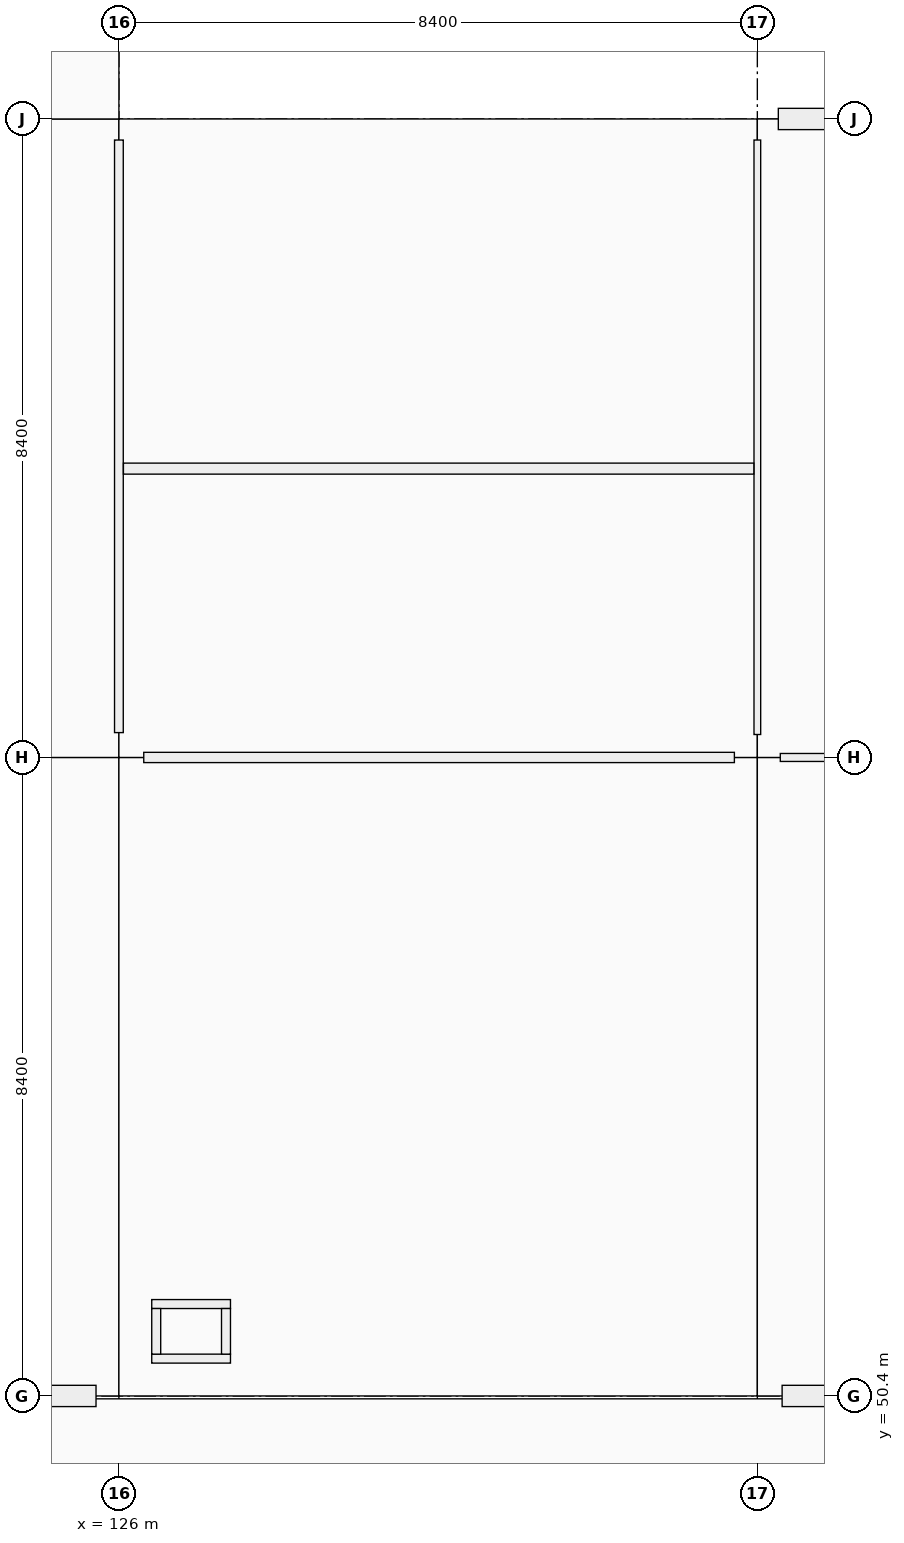
"""IFC4 building model, lengths in metres.
Left out: names, types, materials, properties, quantities, classifications, styles, units other than length and angle.
Written with IfcOpenShell. Run it as: python <this file> out.ifc"""

import sys

from ifc_helpers import new_model, si_unit, direction, frame, frame_2d, origin, origin_2d, place, context, subcontext, project, spatial, rectangle, extrude, element, fill, save


model = new_model("IFC4")
c1 = context("Model", 3, precision=1e-05, world=origin(), true_north=direction((0.0, 1.0)))
c2 = subcontext(c1, "Body", "Model", "MODEL_VIEW")
j1 = project(units=[si_unit("LENGTHUNIT", "METRE"), si_unit("PLANEANGLEUNIT", "RADIAN")], contexts=[c1])
p1 = place(None, origin())
s1 = spatial("IfcSite", under=j1, at=p1, CompositionType="ELEMENT")
p2 = place(p1, origin())
s2 = spatial("IfcBuilding", under=s1, at=p2, CompositionType="ELEMENT")
p3 = place(p2, frame((0.0, 0.0, 10.26)))
s3 = spatial("IfcBuildingStorey", under=s2, at=p3, CompositionType="ELEMENT", Elevation=10.26)
p4 = place(p3, frame((126.0, 50.4, 0.0), z_axis=(0.0, 0.0, 1.0), x_axis=(1.0, 0.0, 0.0)))
e1 = element("IfcColumn", 1, at=p4, inside=s3, PredefinedType="COLUMN", context=c2, shape_type="SweptSolid", body=[
    extrude(rectangle(XDim=0.6, YDim=0.6, at=origin_2d()), origin(), (0.0, 0.0, 1.0), 4.5),
])
p5 = place(p3, frame((126.0, 58.8, 0.0), z_axis=(0.0, 0.0, 1.0), x_axis=(1.0, 0.0, 0.0)))
e2 = element("IfcColumn", 2, at=p5, inside=s3, PredefinedType="COLUMN", context=c2, shape_type="SweptSolid", body=[
    extrude(rectangle(XDim=0.65, YDim=0.65, at=origin_2d()), origin(), (0.0, 0.0, 1.0), 4.5),
])
p6 = place(p3, frame((126.0, 67.2, 0.0), z_axis=(0.0, 0.0, 1.0), x_axis=(1.0, 0.0, 0.0)))
e3 = element("IfcColumn", 3, at=p6, inside=s3, PredefinedType="COLUMN", context=c2, shape_type="SweptSolid", body=[
    extrude(rectangle(XDim=0.55, YDim=0.55, at=origin_2d()), origin(), (0.0, 0.0, 1.0), 4.25),
])
p7 = place(p3, frame((134.4, 50.4, 0.0), z_axis=(0.0, 0.0, 1.0), x_axis=(1.0, 0.0, 0.0)))
e4 = element("IfcColumn", 4, at=p7, inside=s3, PredefinedType="COLUMN", context=c2, shape_type="SweptSolid", body=[
    extrude(rectangle(XDim=0.65, YDim=0.65, at=origin_2d()), origin(), (0.0, 0.0, 1.0), 4.5),
])
p8 = place(p3, frame((134.4, 58.8, 0.0), z_axis=(0.0, 0.0, 1.0), x_axis=(1.0, 0.0, 0.0)))
e5 = element("IfcColumn", 5, at=p8, inside=s3, PredefinedType="COLUMN", context=c2, shape_type="SweptSolid", body=[
    extrude(rectangle(XDim=0.6, YDim=0.6, at=origin_2d()), origin(), (0.0, 0.0, 1.0), 4.5),
])
p9 = place(p3, frame((134.4, 67.2, 0.0), z_axis=(0.0, 0.0, 1.0), x_axis=(1.0, 0.0, 0.0)))
e6 = element("IfcColumn", 6, at=p9, inside=s3, PredefinedType="COLUMN", context=c2, shape_type="SweptSolid", body=[
    extrude(rectangle(XDim=0.55, YDim=0.55, at=origin_2d()), origin(), (0.0, 0.0, 1.0), 4.25),
])
p10 = place(p3, frame((125.699, 50.4, 0.0), z_axis=(0.0, 0.0, 1.0), x_axis=(-1.0, 0.0, 0.0)))
e7 = element("IfcWall", 7, at=p10, inside=s3, PredefinedType="SOLIDWALL", context=c2, shape_type="SweptSolid", body=[
    extrude(rectangle(XDim=7.773, YDim=0.28, at=frame_2d((3.886, 0.0))), origin(), (0.0, 0.0, 1.0), 3.54),
])
p11 = place(p10, frame((2.611, 0.0, 0.9)))
e8 = element("IfcOpeningElement", 8, at=p11, cuts=e7, PredefinedType="OPENING", context=c2, shape_type="SweptSolid", body=[
    extrude(rectangle(XDim=2.55, YDim=1.95, at=frame_2d((1.275, 0.975))), frame((0.0, 0.14, 0.0), z_axis=(0.0, -1.0, 0.0), x_axis=(1.0, 0.0, 0.0)), (0.0, 0.0, 1.0), 0.28),
])
p12 = place(p3, frame((142.499, 50.4, 0.0), z_axis=(0.0, 0.0, 1.0), x_axis=(-1.0, 0.0, 0.0)))
e9 = element("IfcWall", 9, at=p12, inside=s3, PredefinedType="SOLIDWALL", context=c2, shape_type="SweptSolid", body=[
    extrude(rectangle(XDim=7.773, YDim=0.28, at=frame_2d((3.886, 0.0))), origin(), (0.0, 0.0, 1.0), 3.54),
])
p13 = place(p12, frame((2.911, 0.0, 0.9)))
e10 = element("IfcOpeningElement", 10, at=p13, cuts=e9, PredefinedType="OPENING", context=c2, shape_type="SweptSolid", body=[
    extrude(rectangle(XDim=1.95, YDim=1.6, at=frame_2d((0.975, 0.8))), frame((0.0, 0.14, 0.0), z_axis=(0.0, -1.0, 0.0), x_axis=(1.0, 0.0, 0.0)), (0.0, 0.0, 1.0), 0.28),
])
p14 = place(p3, frame((134.676, 67.2, 0.0), z_axis=(0.0, 0.0, 1.0), x_axis=(1.0, 0.0, 0.0)))
e11 = element("IfcWall", 11, at=p14, inside=s3, PredefinedType="SOLIDWALL", context=c2, shape_type="SweptSolid", body=[
    extrude(rectangle(XDim=7.823, YDim=0.28, at=frame_2d((3.912, 0.0))), origin(), (0.0, 0.0, 1.0), 3.54),
])
p15 = place(p14, frame((2.737, 0.0, 0.9)))
e12 = element("IfcOpeningElement", 12, at=p15, cuts=e11, PredefinedType="OPENING", context=c2, shape_type="SweptSolid", body=[
    extrude(rectangle(XDim=2.35, YDim=1.6, at=frame_2d((1.175, 0.8))), frame((0.0, 0.14, 0.0), z_axis=(0.0, -1.0, 0.0), x_axis=(1.0, 0.0, 0.0)), (0.0, 0.0, 1.0), 0.28),
])
for number, where, z_axis, x_axis in (
    (13, (126.432, 50.891, 0.0), (0.0, 0.0, 1.0), (1.0, 0.0, 0.0)),
    (14, (126.432, 51.609, 0.0), (0.0, 0.0, 1.0), (1.0, 0.0, 0.0)),
):
    element("IfcWall", number, at=place(p3, frame(where, z_axis=z_axis, x_axis=x_axis)), inside=s3, PredefinedType="PARTITIONING", context=c2, shape_type="SweptSolid", body=[
        extrude(rectangle(XDim=1.036, YDim=0.118, at=frame_2d((0.518, 0.0))), origin(), (0.0, 0.0, 1.0), 3.53),
    ])
for number, where, z_axis, x_axis in (
    (15, (126.491, 50.95, 0.0), (0.0, 0.0, 1.0), (0.0, 1.0, 0.0)),
    (16, (127.409, 50.95, 0.0), (0.0, 0.0, 1.0), (0.0, 1.0, 0.0)),
):
    element("IfcWall", number, at=place(p3, frame(where, z_axis=z_axis, x_axis=x_axis)), inside=s3, PredefinedType="PARTITIONING", context=c2, shape_type="SweptSolid", body=[
        extrude(rectangle(XDim=0.6, YDim=0.118, at=frame_2d((0.3, 0.0))), origin(), (0.0, 0.0, 1.0), 3.53),
    ])
p16 = place(p3, frame((126.327, 58.8, 0.0), z_axis=(0.0, 0.0, 1.0), x_axis=(1.0, 0.0, 0.0)))
e17 = element("IfcWall", 17, at=p16, inside=s3, PredefinedType="PARTITIONING", context=c2, shape_type="SweptSolid", body=[
    extrude(rectangle(XDim=7.771, YDim=0.135, at=frame_2d((3.885, 0.0))), origin(), (0.0, 0.0, 1.0), 3.37),
])
p17 = place(p3, frame((134.702, 58.8, 0.0), z_axis=(0.0, 0.0, 1.0), x_axis=(1.0, 0.0, 0.0)))
e18 = element("IfcWall", 18, at=p17, inside=s3, PredefinedType="PARTITIONING", context=c2, shape_type="SweptSolid", body=[
    extrude(rectangle(XDim=7.771, YDim=0.105, at=frame_2d((3.885, 0.0))), origin(), (0.0, 0.0, 1.0), 3.37),
])
p18 = place(p17, frame((3.415, 0.0, 0.0)))
e19 = element("IfcOpeningElement", 19, at=p18, cuts=e18, PredefinedType="OPENING", context=c2, shape_type="SweptSolid", body=[
    extrude(rectangle(XDim=0.94, YDim=2.15, at=frame_2d((0.47, 1.075))), frame((0.0, 0.052, 0.0), z_axis=(0.0, -1.0, 0.0), x_axis=(1.0, 0.0, 0.0)), (0.0, 0.0, 1.0), 0.105),
])
p19 = place(p3, frame((126.0, 59.127, 0.0), z_axis=(0.0, 0.0, 1.0), x_axis=(0.0, 1.0, 0.0)))
e20 = element("IfcWall", 20, at=p19, inside=s3, PredefinedType="PARTITIONING", context=c2, shape_type="SweptSolid", body=[
    extrude(rectangle(XDim=7.796, YDim=0.115, at=frame_2d((3.898, 0.0))), origin(), (0.0, 0.0, 1.0), 3.37),
])
p20 = place(p19, frame((1.253, 0.0, 0.0)))
e21 = element("IfcOpeningElement", 21, at=p20, cuts=e20, PredefinedType="OPENING", context=c2, shape_type="SweptSolid", body=[
    extrude(rectangle(XDim=0.92, YDim=2.15, at=frame_2d((0.46, 1.075))), frame((0.0, 0.058, 0.0), z_axis=(0.0, -1.0, 0.0), x_axis=(1.0, 0.0, 0.0)), (0.0, 0.0, 1.0), 0.115),
])
p21 = place(p19, frame((5.108, 0.0, 0.0)))
e22 = element("IfcOpeningElement", 22, at=p21, cuts=e20, PredefinedType="OPENING", context=c2, shape_type="SweptSolid", body=[
    extrude(rectangle(XDim=1.05, YDim=2.12, at=frame_2d((0.525, 1.06))), frame((0.0, 0.058, 0.0), z_axis=(0.0, -1.0, 0.0), x_axis=(1.0, 0.0, 0.0)), (0.0, 0.0, 1.0), 0.115),
])
p22 = place(p3, frame((134.4, 59.102, 0.0), z_axis=(0.0, 0.0, 1.0), x_axis=(0.0, 1.0, 0.0)))
e23 = element("IfcWall", 23, at=p22, inside=s3, PredefinedType="PARTITIONING", context=c2, shape_type="SweptSolid", body=[
    extrude(rectangle(XDim=7.821, YDim=0.088, at=frame_2d((3.911, 0.0))), origin(), (0.0, 0.0, 1.0), 3.37),
])
p23 = place(p3, frame((126.06, 62.6, 0.0), z_axis=(0.0, 0.0, 1.0), x_axis=(1.0, 0.0, 0.0)))
e24 = element("IfcWall", 24, at=p23, inside=s3, PredefinedType="PARTITIONING", context=c2, shape_type="SweptSolid", body=[
    extrude(rectangle(XDim=8.294, YDim=0.145, at=frame_2d((4.147, 0.0))), origin(), (0.0, 0.0, 1.0), 3.37),
])
p24 = place(p20, origin())
e25 = element("IfcDoor", 25, at=p24, inside=s3, OperationType="SINGLE_SWING_RIGHT", PredefinedType="DOOR", context=c2, shape_type="SweptSolid", body=[
    extrude(rectangle(XDim=0.92, YDim=2.15, at=frame_2d((0.46, 1.075))), frame((0.0, 0.025, 0.0), z_axis=(0.0, -1.0, 0.0), x_axis=(1.0, 0.0, 0.0)), (0.0, 0.0, 1.0), 0.05),
])
fill(e21, e25)
p25 = place(p21, origin())
e26 = element("IfcDoor", 26, at=p25, inside=s3, OperationType="SINGLE_SWING_LEFT", PredefinedType="DOOR", context=c2, shape_type="SweptSolid", body=[
    extrude(rectangle(XDim=1.05, YDim=2.12, at=frame_2d((0.525, 1.06))), frame((0.0, 0.025, 0.0), z_axis=(0.0, -1.0, 0.0), x_axis=(1.0, 0.0, 0.0)), (0.0, 0.0, 1.0), 0.05),
])
fill(e22, e26)
save(model, sys.argv[1])
